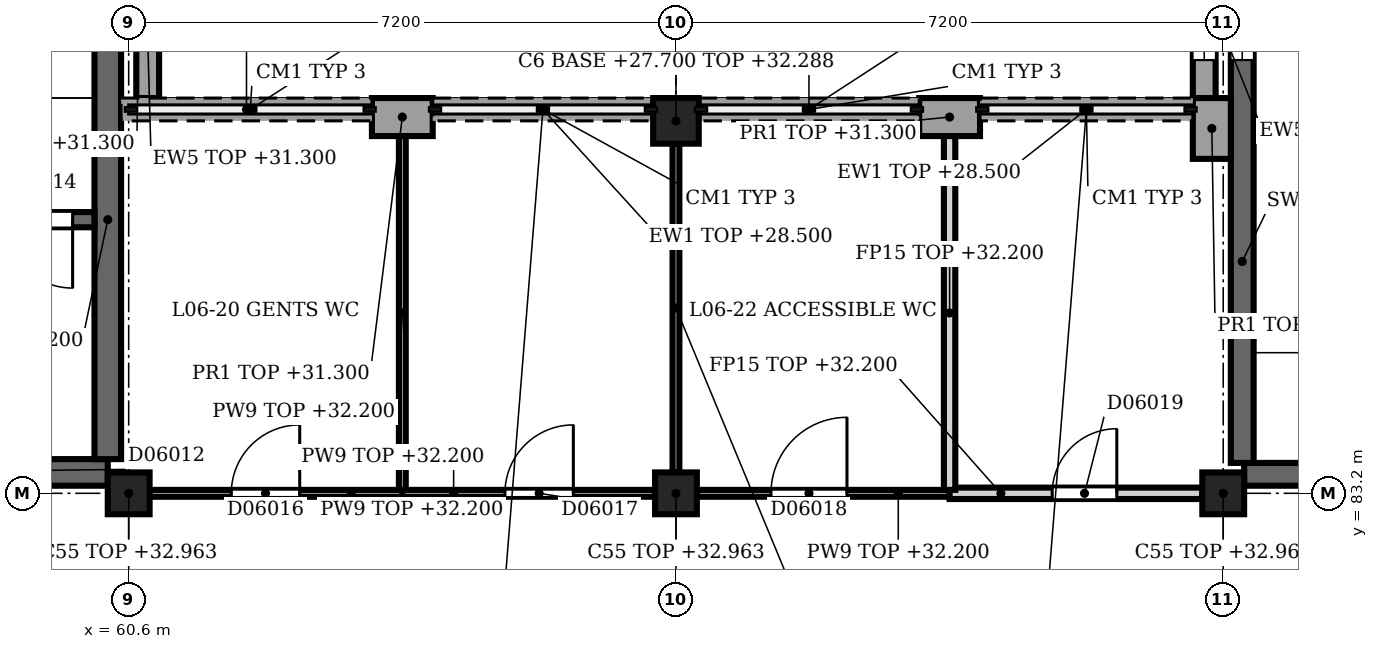
"""IFC4 building model, lengths in metres.
Left out: names, types, materials, properties, quantities, classifications, styles, units other than length and angle.
Written with IfcOpenShell. Run it as: python <this file> out.ifc"""

import sys

from ifc_helpers import new_model, si_unit, direction, frame, frame_2d, origin, origin_2d, place, context, subcontext, project, spatial, rectangle, extrude, element, fill, save


model = new_model("IFC4")
c1 = context("Model", 3, precision=1e-05, world=origin(), true_north=direction((0.0, 1.0)))
c2 = subcontext(c1, "Body", "Model", "MODEL_VIEW")
j1 = project(units=[si_unit("LENGTHUNIT", "METRE"), si_unit("PLANEANGLEUNIT", "RADIAN")], contexts=[c1])
p1 = place(None, origin())
s1 = spatial("IfcSite", under=j1, at=p1, CompositionType="ELEMENT")
p2 = place(p1, origin())
s2 = spatial("IfcBuilding", under=s1, at=p2, CompositionType="ELEMENT")
p3 = place(p2, frame((0.0, 0.0, 27.9)))
s3 = spatial("IfcBuildingStorey", under=s2, at=p3, CompositionType="ELEMENT", Elevation=27.9)
for number, where, z_axis, x_axis in (
    (1, (60.6, 83.2, 0.0), (0.0, 0.0, 1.0), (1.0, 0.0, 0.0)),
    (2, (67.8, 83.2, 0.0), (0.0, 0.0, 1.0), (1.0, 0.0, 0.0)),
    (3, (75.0, 83.2, 0.0), (0.0, 0.0, 1.0), (1.0, 0.0, 0.0)),
):
    element("IfcColumn", number, at=place(p3, frame(where, z_axis=z_axis, x_axis=x_axis)), inside=s3, PredefinedType="COLUMN", context=c2, shape_type="SweptSolid", body=[
        extrude(rectangle(XDim=0.55, YDim=0.55, at=origin_2d()), origin(), (0.0, 0.0, 1.0), 5.063),
    ])
p4 = place(p3, frame((67.8, 88.1, -0.2), z_axis=(0.0, 0.0, 1.0), x_axis=(1.0, 0.0, 0.0)))
e4 = element("IfcColumn", 4, at=p4, inside=s3, PredefinedType="COLUMN", context=c2, shape_type="SweptSolid", body=[
    extrude(rectangle(XDim=0.6, YDim=0.6, at=origin_2d()), origin(), (0.0, 0.0, 1.0), 4.588),
])
p5 = place(p3, frame((60.85, 90.0, 0.0), z_axis=(0.0, 0.0, 1.0), x_axis=(0.0, -1.0, 0.0)))
e5 = element("IfcWall", 5, at=p5, inside=s3, PredefinedType="SOLIDWALL", context=c2, shape_type="SweptSolid", body=[
    extrude(rectangle(XDim=1.6, YDim=0.3, at=frame_2d((0.8, 0.0))), origin(), (0.0, 0.0, 1.0), 3.4),
])
for number, where, z_axis, x_axis in (
    (6, (63.8, 88.15, 0.0), (0.0, 0.0, 1.0), (1.0, 0.0, 0.0)),
    (7, (71.0, 88.15, 0.0), (0.0, 0.0, 1.0), (1.0, 0.0, 0.0)),
):
    element("IfcWall", number, at=place(p3, frame(where, z_axis=z_axis, x_axis=x_axis)), inside=s3, PredefinedType="SOLIDWALL", context=c2, shape_type="SweptSolid", body=[
        extrude(rectangle(XDim=0.8, YDim=0.5, at=frame_2d((0.4, 0.0))), origin(), (0.0, 0.0, 1.0), 3.4),
    ])
p6 = place(p3, frame((60.5, 88.25, 0.0), z_axis=(0.0, 0.0, 1.0), x_axis=(1.0, 0.0, 0.0)))
e8 = element("IfcWall", 8, at=p6, inside=s3, PredefinedType="SOLIDWALL", context=c2, shape_type="SweptSolid", body=[
    extrude(rectangle(XDim=3.3, YDim=0.3, at=frame_2d((1.65, 0.0))), origin(), (0.0, 0.0, 1.0), 0.6),
])
for number, where, z_axis, x_axis in (
    (9, (64.6, 88.25, 0.0), (0.0, 0.0, 1.0), (1.0, 0.0, 0.0)),
    (10, (68.1, 88.25, 0.0), (0.0, 0.0, 1.0), (1.0, 0.0, 0.0)),
):
    element("IfcWall", number, at=place(p3, frame(where, z_axis=z_axis, x_axis=x_axis)), inside=s3, PredefinedType="SOLIDWALL", context=c2, shape_type="SweptSolid", body=[
        extrude(rectangle(XDim=2.9, YDim=0.3, at=frame_2d((1.45, 0.0))), origin(), (0.0, 0.0, 1.0), 0.6),
    ])
p7 = place(p3, frame((71.8, 88.25, 0.0), z_axis=(0.0, 0.0, 1.0), x_axis=(1.0, 0.0, 0.0)))
e11 = element("IfcWall", 11, at=p7, inside=s3, PredefinedType="SOLIDWALL", context=c2, shape_type="SweptSolid", body=[
    extrude(rectangle(XDim=2.8, YDim=0.3, at=frame_2d((1.4, 0.0))), origin(), (0.0, 0.0, 1.0), 0.6),
])
p8 = place(p3, frame((74.85, 87.6, 0.0), z_axis=(0.0, 0.0, 1.0), x_axis=(0.0, 1.0, 0.0)))
e12 = element("IfcWall", 12, at=p8, inside=s3, PredefinedType="SOLIDWALL", context=c2, shape_type="SweptSolid", body=[
    extrude(rectangle(XDim=0.8, YDim=0.5, at=frame_2d((0.4, 0.0))), origin(), (0.0, 0.0, 1.0), 3.4),
])
p9 = place(p3, frame((74.75, 88.4, 0.0), z_axis=(0.0, 0.0, 1.0), x_axis=(0.0, 1.0, 0.0)))
e13 = element("IfcWall", 13, at=p9, inside=s3, PredefinedType="SOLIDWALL", context=c2, shape_type="SweptSolid", body=[
    extrude(rectangle(XDim=1.9, YDim=0.3, at=frame_2d((0.95, 0.0))), origin(), (0.0, 0.0, 1.0), 3.4),
])
p10 = place(p9, frame((0.5, 0.0, 1.2)))
e14 = element("IfcOpeningElement", 14, at=p10, cuts=e13, PredefinedType="OPENING", context=c2, shape_type="SweptSolid", body=[
    extrude(rectangle(XDim=0.6, YDim=1.8, at=frame_2d((0.3, 0.9))), frame((0.0, 0.16, 0.0), z_axis=(0.0, -1.0, 0.0), x_axis=(1.0, 0.0, 0.0)), (0.0, 0.0, 1.0), 0.32),
])
p11 = place(p3, frame((53.675, 83.475, 0.0), z_axis=(0.0, 0.0, 1.0), x_axis=(1.0, 0.0, 0.0)))
e15 = element("IfcWall", 15, at=p11, inside=s3, PredefinedType="SHEAR", context=c2, shape_type="SweptSolid", body=[
    extrude(rectangle(XDim=6.65, YDim=0.35, at=frame_2d((3.325, 0.0))), origin(), (0.0, 0.0, 1.0), 4.3),
])
p12 = place(p11, frame((2.725, 0.0, 0.0)))
e16 = element("IfcOpeningElement", 16, at=p12, cuts=e15, PredefinedType="OPENING", context=c2, shape_type="SweptSolid", body=[
    extrude(rectangle(XDim=1.8, YDim=2.1, at=frame_2d((0.9, 1.05))), frame((0.0, 0.185, 0.0), z_axis=(0.0, -1.0, 0.0), x_axis=(1.0, 0.0, 0.0)), (0.0, 0.0, 1.0), 0.37),
])
p13 = place(p3, frame((60.325, 83.65, 0.0), z_axis=(0.0, 0.0, 1.0), x_axis=(0.0, 1.0, 0.0)))
e17 = element("IfcWall", 17, at=p13, inside=s3, PredefinedType="SHEAR", context=c2, shape_type="SweptSolid", body=[
    extrude(rectangle(XDim=6.3, YDim=0.35, at=frame_2d((3.15, 0.0))), origin(), (0.0, 0.0, 1.0), 4.3),
])
p14 = place(p3, frame((60.15, 86.8, 0.0), z_axis=(0.0, 0.0, 1.0), x_axis=(-1.0, 0.0, 0.0)))
e18 = element("IfcWall", 18, at=p14, inside=s3, PredefinedType="SHEAR", context=c2, shape_type="SweptSolid", body=[
    extrude(rectangle(XDim=10.35, YDim=0.2, at=frame_2d((5.175, 0.0))), origin(), (0.0, 0.0, 1.0), 4.3),
])
p15 = place(p14, frame((8.8, 0.0, 0.0)))
e19 = element("IfcOpeningElement", 19, at=p15, cuts=e18, PredefinedType="OPENING", context=c2, shape_type="SweptSolid", body=[
    extrude(rectangle(XDim=1.1, YDim=2.1, at=frame_2d((0.55, 1.05))), frame((0.0, 0.11, 0.0), z_axis=(0.0, -1.0, 0.0), x_axis=(1.0, 0.0, 0.0)), (0.0, 0.0, 1.0), 0.22),
])
p16 = place(p14, frame((6.6, 0.0, 0.0)))
e20 = element("IfcOpeningElement", 20, at=p16, cuts=e18, PredefinedType="OPENING", context=c2, shape_type="SweptSolid", body=[
    extrude(rectangle(XDim=1.1, YDim=2.1, at=frame_2d((0.55, 1.05))), frame((0.0, 0.11, 0.0), z_axis=(0.0, -1.0, 0.0), x_axis=(1.0, 0.0, 0.0)), (0.0, 0.0, 1.0), 0.22),
])
p17 = place(p14, frame((3.75, 0.0, 0.0)))
e21 = element("IfcOpeningElement", 21, at=p17, cuts=e18, PredefinedType="OPENING", context=c2, shape_type="SweptSolid", body=[
    extrude(rectangle(XDim=1.4, YDim=2.1, at=frame_2d((0.7, 1.05))), frame((0.0, 0.11, 0.0), z_axis=(0.0, -1.0, 0.0), x_axis=(1.0, 0.0, 0.0)), (0.0, 0.0, 1.0), 0.22),
])
p18 = place(p14, frame((1.962, 0.0, 0.0)))
e22 = element("IfcOpeningElement", 22, at=p18, cuts=e18, PredefinedType="OPENING", context=c2, shape_type="SweptSolid", body=[
    extrude(rectangle(XDim=0.9, YDim=2.1, at=frame_2d((0.45, 1.05))), frame((0.0, 0.11, 0.0), z_axis=(0.0, -1.0, 0.0), x_axis=(1.0, 0.0, 0.0)), (0.0, 0.0, 1.0), 0.22),
])
p19 = place(p14, frame((0.288, 0.0, 0.0)))
e23 = element("IfcOpeningElement", 23, at=p19, cuts=e18, PredefinedType="OPENING", context=c2, shape_type="SweptSolid", body=[
    extrude(rectangle(XDim=0.9, YDim=2.1, at=frame_2d((0.45, 1.05))), frame((0.0, 0.11, 0.0), z_axis=(0.0, -1.0, 0.0), x_axis=(1.0, 0.0, 0.0)), (0.0, 0.0, 1.0), 0.22),
])
p20 = place(p3, frame((75.275, 83.45, 0.0), z_axis=(0.0, 0.0, 1.0), x_axis=(1.0, 0.0, 0.0)))
e24 = element("IfcWall", 24, at=p20, inside=s3, PredefinedType="SHEAR", context=c2, shape_type="SweptSolid", body=[
    extrude(rectangle(XDim=6.775, YDim=0.3, at=frame_2d((3.388, 0.0))), origin(), (0.0, 0.0, 1.0), 4.3),
])
p21 = place(p20, frame((4.325, 0.0, 0.0)))
e25 = element("IfcOpeningElement", 25, at=p21, cuts=e24, PredefinedType="OPENING", context=c2, shape_type="SweptSolid", body=[
    extrude(rectangle(XDim=1.2, YDim=2.1, at=frame_2d((0.6, 1.05))), frame((0.0, 0.16, 0.0), z_axis=(0.0, -1.0, 0.0), x_axis=(1.0, 0.0, 0.0)), (0.0, 0.0, 1.0), 0.32),
])
p22 = place(p3, frame((75.25, 83.6, 0.0), z_axis=(0.0, 0.0, 1.0), x_axis=(0.0, 1.0, 0.0)))
e26 = element("IfcWall", 26, at=p22, inside=s3, PredefinedType="SHEAR", context=c2, shape_type="SweptSolid", body=[
    extrude(rectangle(XDim=6.4, YDim=0.3, at=frame_2d((3.2, 0.0))), origin(), (0.0, 0.0, 1.0), 4.3),
])
p23 = place(p22, frame((5.3, 0.0, 1.2)))
e27 = element("IfcOpeningElement", 27, at=p23, cuts=e26, PredefinedType="OPENING", context=c2, shape_type="SweptSolid", body=[
    extrude(rectangle(XDim=0.6, YDim=1.8, at=frame_2d((0.3, 0.9))), frame((0.0, 0.16, 0.0), z_axis=(0.0, -1.0, 0.0), x_axis=(1.0, 0.0, 0.0)), (0.0, 0.0, 1.0), 0.32),
])
p24 = place(p3, frame((60.875, 83.2, 0.0), z_axis=(0.0, 0.0, 1.0), x_axis=(1.0, 0.0, 0.0)))
e28 = element("IfcWall", 28, at=p24, inside=s3, PredefinedType="PARTITIONING", context=c2, shape_type="SweptSolid", body=[
    extrude(rectangle(XDim=3.325, YDim=0.09, at=frame_2d((1.663, 0.0))), origin(), (0.0, 0.0, 1.0), 4.3),
])
p25 = place(p24, frame((1.075, 0.0, 0.0)))
e29 = element("IfcOpeningElement", 29, at=p25, cuts=e28, PredefinedType="OPENING", context=c2, shape_type="SweptSolid", body=[
    extrude(rectangle(XDim=0.9, YDim=2.1, at=frame_2d((0.45, 1.05))), frame((0.0, 0.055, 0.0), z_axis=(0.0, -1.0, 0.0), x_axis=(1.0, 0.0, 0.0)), (0.0, 0.0, 1.0), 0.11),
])
p26 = place(p3, frame((64.2, 83.2, 0.0), z_axis=(0.0, 0.0, 1.0), x_axis=(1.0, 0.0, 0.0)))
e30 = element("IfcWall", 30, at=p26, inside=s3, PredefinedType="PARTITIONING", context=c2, shape_type="SweptSolid", body=[
    extrude(rectangle(XDim=3.325, YDim=0.09, at=frame_2d((1.663, 0.0))), origin(), (0.0, 0.0, 1.0), 4.3),
])
p27 = place(p26, frame((1.35, 0.0, 0.0)))
e31 = element("IfcOpeningElement", 31, at=p27, cuts=e30, PredefinedType="OPENING", context=c2, shape_type="SweptSolid", body=[
    extrude(rectangle(XDim=0.9, YDim=2.1, at=frame_2d((0.45, 1.05))), frame((0.0, 0.055, 0.0), z_axis=(0.0, -1.0, 0.0), x_axis=(1.0, 0.0, 0.0)), (0.0, 0.0, 1.0), 0.11),
])
p28 = place(p3, frame((68.075, 83.2, 0.0), z_axis=(0.0, 0.0, 1.0), x_axis=(1.0, 0.0, 0.0)))
e32 = element("IfcWall", 32, at=p28, inside=s3, PredefinedType="PARTITIONING", context=c2, shape_type="SweptSolid", body=[
    extrude(rectangle(XDim=3.325, YDim=0.09, at=frame_2d((1.663, 0.0))), origin(), (0.0, 0.0, 1.0), 4.3),
])
p29 = place(p28, frame((0.975, 0.0, 0.0)))
e33 = element("IfcOpeningElement", 33, at=p29, cuts=e32, PredefinedType="OPENING", context=c2, shape_type="SweptSolid", body=[
    extrude(rectangle(XDim=1.0, YDim=2.2, at=frame_2d((0.5, 1.1))), frame((0.0, 0.055, 0.0), z_axis=(0.0, -1.0, 0.0), x_axis=(1.0, 0.0, 0.0)), (0.0, 0.0, 1.0), 0.11),
])
p30 = place(p3, frame((71.4, 83.2, 0.0), z_axis=(0.0, 0.0, 1.0), x_axis=(1.0, 0.0, 0.0)))
e34 = element("IfcWall", 34, at=p30, inside=s3, PredefinedType="PARTITIONING", context=c2, shape_type="SweptSolid", body=[
    extrude(rectangle(XDim=3.325, YDim=0.15, at=frame_2d((1.663, 0.0))), origin(), (0.0, 0.0, 1.0), 4.3),
])
p31 = place(p30, frame((1.35, 0.0, 0.0)))
e35 = element("IfcOpeningElement", 35, at=p31, cuts=e34, PredefinedType="OPENING", context=c2, shape_type="SweptSolid", body=[
    extrude(rectangle(XDim=0.85, YDim=2.1, at=frame_2d((0.425, 1.05))), frame((0.0, 0.085, 0.0), z_axis=(0.0, -1.0, 0.0), x_axis=(1.0, 0.0, 0.0)), (0.0, 0.0, 1.0), 0.17),
])
p32 = place(p3, frame((64.2, 83.245, 0.0), z_axis=(0.0, 0.0, 1.0), x_axis=(0.0, 1.0, 0.0)))
e36 = element("IfcWall", 36, at=p32, inside=s3, PredefinedType="PARTITIONING", context=c2, shape_type="SweptSolid", body=[
    extrude(rectangle(XDim=4.655, YDim=0.09, at=frame_2d((2.327, 0.0))), origin(), (0.0, 0.0, 1.0), 4.3),
])
p33 = place(p3, frame((67.8, 83.475, 0.0), z_axis=(0.0, 0.0, 1.0), x_axis=(0.0, 1.0, 0.0)))
e37 = element("IfcWall", 37, at=p33, inside=s3, PredefinedType="PARTITIONING", context=c2, shape_type="SweptSolid", body=[
    extrude(rectangle(XDim=4.325, YDim=0.09, at=frame_2d((2.163, 0.0))), origin(), (0.0, 0.0, 1.0), 4.3),
])
p34 = place(p3, frame((71.4, 83.245, 0.0), z_axis=(0.0, 0.0, 1.0), x_axis=(0.0, 1.0, 0.0)))
e38 = element("IfcWall", 38, at=p34, inside=s3, PredefinedType="PARTITIONING", context=c2, shape_type="SweptSolid", body=[
    extrude(rectangle(XDim=4.655, YDim=0.15, at=frame_2d((2.327, 0.0))), origin(), (0.0, 0.0, 1.0), 4.3),
])
p35 = place(p10, origin())
e39 = element("IfcWindow", 39, at=p35, inside=s3, PartitioningType="SINGLE_PANEL", PredefinedType="WINDOW", context=c2, shape_type="SweptSolid", body=[
    extrude(rectangle(XDim=0.6, YDim=1.8, at=frame_2d((0.3, 0.9))), frame((0.0, 0.03, 0.0), z_axis=(0.0, -1.0, 0.0), x_axis=(1.0, 0.0, 0.0)), (0.0, 0.0, 1.0), 0.06),
])
fill(e14, e39)
p36 = place(p19, origin())
e40 = element("IfcDoor", 40, at=p36, inside=s3, OperationType="SINGLE_SWING_LEFT", PredefinedType="DOOR", context=c2, shape_type="SweptSolid", body=[
    extrude(rectangle(XDim=0.9, YDim=2.1, at=frame_2d((0.45, 1.05))), frame((0.0, 0.025, 0.0), z_axis=(0.0, -1.0, 0.0), x_axis=(1.0, 0.0, 0.0)), (0.0, 0.0, 1.0), 0.05),
])
fill(e23, e40)
p37 = place(p23, origin())
e41 = element("IfcWindow", 41, at=p37, inside=s3, PartitioningType="SINGLE_PANEL", PredefinedType="WINDOW", context=c2, shape_type="SweptSolid", body=[
    extrude(rectangle(XDim=0.6, YDim=1.8, at=frame_2d((0.3, 0.9))), frame((0.0, 0.03, 0.0), z_axis=(0.0, -1.0, 0.0), x_axis=(1.0, 0.0, 0.0)), (0.0, 0.0, 1.0), 0.06),
])
fill(e27, e41)
p38 = place(p25, origin())
e42 = element("IfcDoor", 42, at=p38, inside=s3, OperationType="SINGLE_SWING_LEFT", PredefinedType="DOOR", context=c2, shape_type="SweptSolid", body=[
    extrude(rectangle(XDim=0.9, YDim=2.1, at=frame_2d((0.45, 1.05))), frame((0.0, 0.025, 0.0), z_axis=(0.0, -1.0, 0.0), x_axis=(1.0, 0.0, 0.0)), (0.0, 0.0, 1.0), 0.05),
])
fill(e29, e42)
p39 = place(p27, origin())
e43 = element("IfcDoor", 43, at=p39, inside=s3, OperationType="SINGLE_SWING_RIGHT", PredefinedType="DOOR", context=c2, shape_type="SweptSolid", body=[
    extrude(rectangle(XDim=0.9, YDim=2.1, at=frame_2d((0.45, 1.05))), frame((0.0, 0.025, 0.0), z_axis=(0.0, -1.0, 0.0), x_axis=(1.0, 0.0, 0.0)), (0.0, 0.0, 1.0), 0.05),
])
fill(e31, e43)
p40 = place(p29, origin())
e44 = element("IfcDoor", 44, at=p40, inside=s3, OperationType="SINGLE_SWING_LEFT", PredefinedType="DOOR", context=c2, shape_type="SweptSolid", body=[
    extrude(rectangle(XDim=1.0, YDim=2.2, at=frame_2d((0.5, 1.1))), frame((0.0, 0.025, 0.0), z_axis=(0.0, -1.0, 0.0), x_axis=(1.0, 0.0, 0.0)), (0.0, 0.0, 1.0), 0.05),
])
fill(e33, e44)
p41 = place(p31, origin())
e45 = element("IfcDoor", 45, at=p41, inside=s3, OperationType="SINGLE_SWING_RIGHT", PredefinedType="DOOR", context=c2, shape_type="SweptSolid", body=[
    extrude(rectangle(XDim=0.85, YDim=2.1, at=frame_2d((0.425, 1.05))), frame((0.0, 0.025, 0.0), z_axis=(0.0, -1.0, 0.0), x_axis=(1.0, 0.0, 0.0)), (0.0, 0.0, 1.0), 0.05),
])
fill(e35, e45)
save(model, sys.argv[1])
